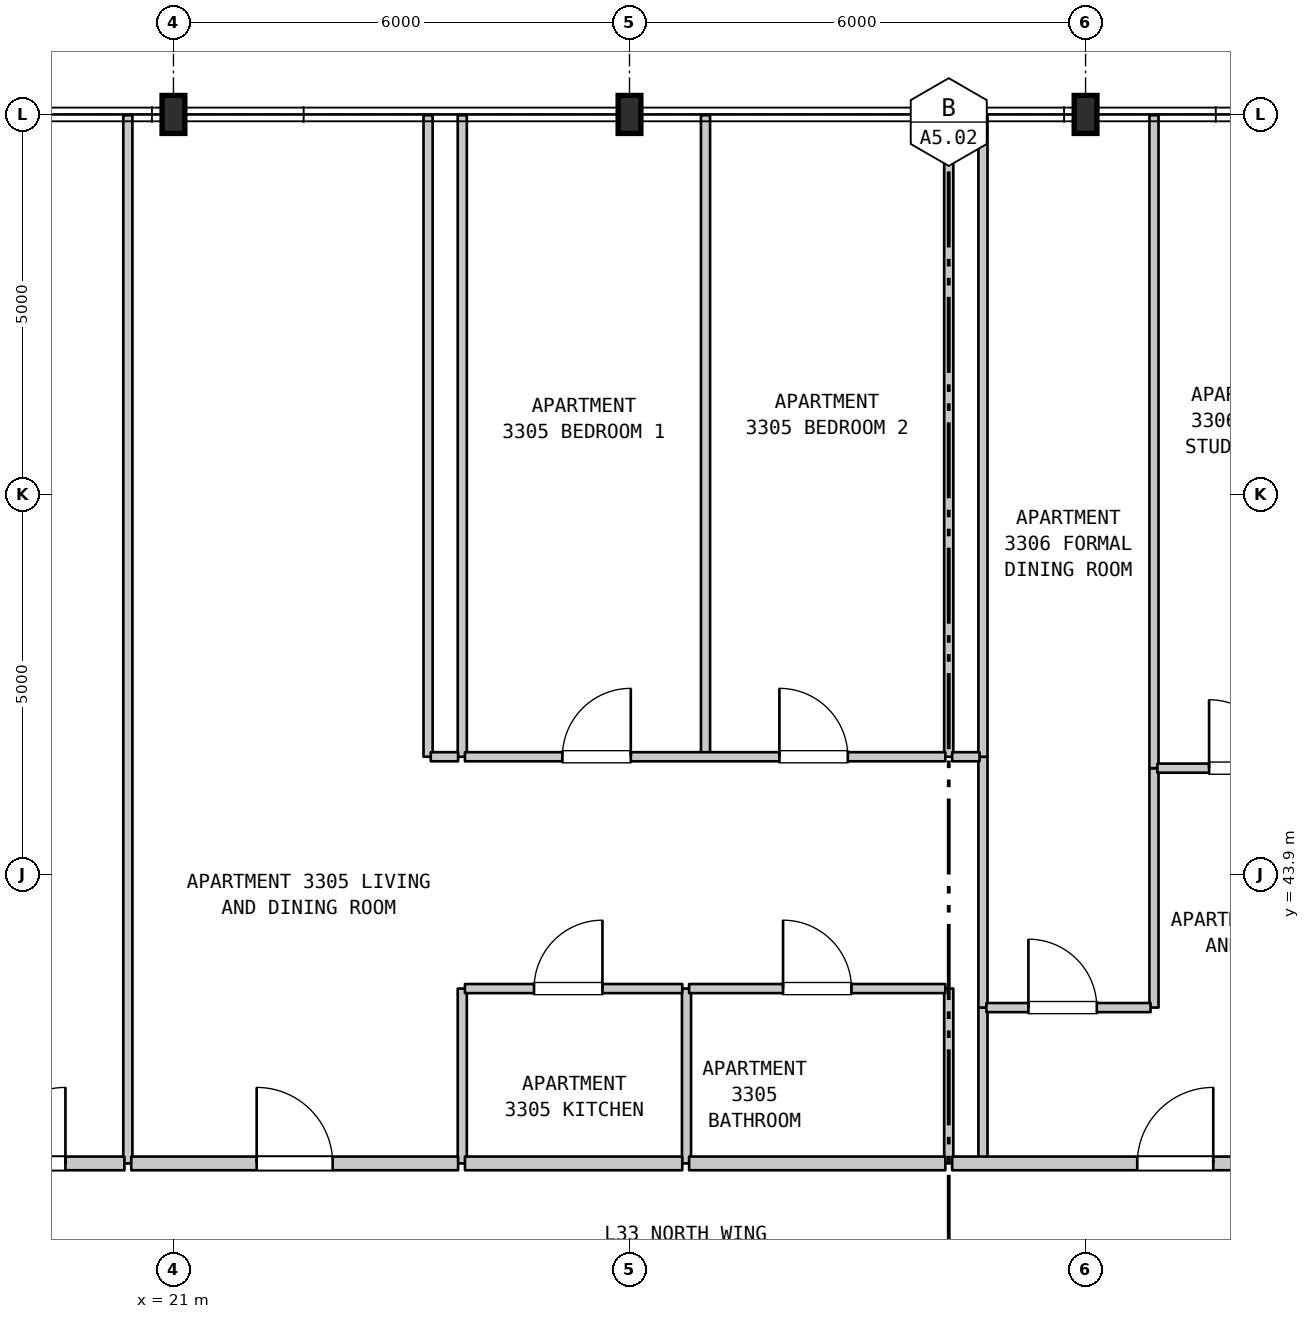
"""IFC4 building model, lengths in metres.
Left out: names, types, materials, properties, quantities, classifications, styles, units other than length and angle.
Written with IfcOpenShell. Run it as: python <this file> out.ifc"""

import sys

from ifc_helpers import new_model, si_unit, direction, frame, frame_2d, origin, origin_2d, place, context, subcontext, project, spatial, rectangle, i_section, extrude, element, fill, save


model = new_model("IFC4")
c1 = context("Model", 3, precision=1e-05, world=origin(), true_north=direction((0.0, 1.0)))
c2 = subcontext(c1, "Body", "Model", "MODEL_VIEW")
j1 = project(units=[si_unit("LENGTHUNIT", "METRE"), si_unit("PLANEANGLEUNIT", "RADIAN")], contexts=[c1])
p1 = place(None, origin())
s1 = spatial("IfcSite", under=j1, at=p1, CompositionType="ELEMENT")
p2 = place(p1, origin())
s2 = spatial("IfcBuilding", under=s1, at=p2, CompositionType="ELEMENT")
p3 = place(p2, frame((0.0, 0.0, 137.2)))
s3 = spatial("IfcBuildingStorey", under=s2, at=p3, CompositionType="ELEMENT", Elevation=137.2)
for number, where, z_axis, x_axis in (
    (1, (21.0, 53.9, 0.0), (0.0, 0.0, 1.0), (1.0, 0.0, 0.0)),
    (2, (27.0, 53.9, 0.0), (0.0, 0.0, 1.0), (1.0, 0.0, 0.0)),
    (3, (33.0, 53.9, 0.0), (0.0, 0.0, 1.0), (1.0, 0.0, 0.0)),
):
    element("IfcColumn", number, at=place(p3, frame(where, z_axis=z_axis, x_axis=x_axis)), inside=s3, PredefinedType="COLUMN", context=c2, shape_type="SweptSolid", body=[
        extrude(i_section(OverallWidth=0.3, OverallDepth=0.5, WebThickness=0.014, FlangeThickness=0.028, FilletRadius=0.027, at=origin_2d()), origin(), (0.0, 0.0, 1.0), 3.7),
    ])
p4 = place(p3, frame((20.4, 40.1, 0.0), z_axis=(0.0, 0.0, 1.0), x_axis=(0.0, 1.0, 0.0)))
e4 = element("IfcWall", 4, at=p4, inside=s3, PredefinedType="PARTITIONING", context=c2, shape_type="SweptSolid", body=[
    extrude(rectangle(XDim=13.79, YDim=0.12, at=frame_2d((6.895, 0.0))), origin(), (0.0, 0.0, 1.0), 3.385),
])
p5 = place(p3, frame((24.35, 45.45, 0.0), z_axis=(0.0, 0.0, 1.0), x_axis=(0.0, 1.0, 0.0)))
e5 = element("IfcWall", 5, at=p5, inside=s3, PredefinedType="PARTITIONING", context=c2, shape_type="SweptSolid", body=[
    extrude(rectangle(XDim=8.44, YDim=0.12, at=frame_2d((4.22, 0.0))), origin(), (0.0, 0.0, 1.0), 3.385),
])
p6 = place(p3, frame((24.8, 40.1, 0.0), z_axis=(0.0, 0.0, 1.0), x_axis=(0.0, 1.0, 0.0)))
e6 = element("IfcWall", 6, at=p6, inside=s3, PredefinedType="PARTITIONING", context=c2, shape_type="SweptSolid", body=[
    extrude(rectangle(XDim=2.3, YDim=0.12, at=frame_2d((1.15, 0.0))), origin(), (0.0, 0.0, 1.0), 3.385),
])
p7 = place(p3, frame((24.8, 45.45, 0.0), z_axis=(0.0, 0.0, 1.0), x_axis=(0.0, 1.0, 0.0)))
e7 = element("IfcWall", 7, at=p7, inside=s3, PredefinedType="PARTITIONING", context=c2, shape_type="SweptSolid", body=[
    extrude(rectangle(XDim=8.44, YDim=0.12, at=frame_2d((4.22, 0.0))), origin(), (0.0, 0.0, 1.0), 3.385),
])
p8 = place(p3, frame((27.75, 40.1, 0.0), z_axis=(0.0, 0.0, 1.0), x_axis=(0.0, 1.0, 0.0)))
e8 = element("IfcWall", 8, at=p8, inside=s3, PredefinedType="PARTITIONING", context=c2, shape_type="SweptSolid", body=[
    extrude(rectangle(XDim=2.3, YDim=0.12, at=frame_2d((1.15, 0.0))), origin(), (0.0, 0.0, 1.0), 3.385),
])
p9 = place(p3, frame((28.0, 45.45, 0.0), z_axis=(0.0, 0.0, 1.0), x_axis=(0.0, 1.0, 0.0)))
e9 = element("IfcWall", 9, at=p9, inside=s3, PredefinedType="PARTITIONING", context=c2, shape_type="SweptSolid", body=[
    extrude(rectangle(XDim=8.44, YDim=0.12, at=frame_2d((4.22, 0.0))), origin(), (0.0, 0.0, 1.0), 3.385),
])
p10 = place(p3, frame((31.2, 40.1, 0.0), z_axis=(0.0, 0.0, 1.0), x_axis=(0.0, 1.0, 0.0)))
e10 = element("IfcWall", 10, at=p10, inside=s3, PredefinedType="PARTITIONING", context=c2, shape_type="SweptSolid", body=[
    extrude(rectangle(XDim=2.3, YDim=0.12, at=frame_2d((1.15, 0.0))), origin(), (0.0, 0.0, 1.0), 3.385),
])
p11 = place(p3, frame((31.2, 45.45, 0.0), z_axis=(0.0, 0.0, 1.0), x_axis=(0.0, 1.0, 0.0)))
e11 = element("IfcWall", 11, at=p11, inside=s3, PredefinedType="PARTITIONING", context=c2, shape_type="SweptSolid", body=[
    extrude(rectangle(XDim=8.44, YDim=0.12, at=frame_2d((4.22, 0.0))), origin(), (0.0, 0.0, 1.0), 3.385),
])
p12 = place(p3, frame((31.65, 40.1, 0.0), z_axis=(0.0, 0.0, 1.0), x_axis=(0.0, 1.0, 0.0)))
e12 = element("IfcWall", 12, at=p12, inside=s3, PredefinedType="PARTITIONING", context=c2, shape_type="SweptSolid", body=[
    extrude(rectangle(XDim=2.05, YDim=0.12, at=frame_2d((1.025, 0.0))), origin(), (0.0, 0.0, 1.0), 3.385),
])
p13 = place(p3, frame((31.65, 42.15, 0.0), z_axis=(0.0, 0.0, 1.0), x_axis=(0.0, 1.0, 0.0)))
e13 = element("IfcWall", 13, at=p13, inside=s3, PredefinedType="PARTITIONING", context=c2, shape_type="SweptSolid", body=[
    extrude(rectangle(XDim=3.3, YDim=0.12, at=frame_2d((1.65, 0.0))), origin(), (0.0, 0.0, 1.0), 3.385),
])
p14 = place(p3, frame((31.65, 45.45, 0.0), z_axis=(0.0, 0.0, 1.0), x_axis=(0.0, 1.0, 0.0)))
e14 = element("IfcWall", 14, at=p14, inside=s3, PredefinedType="PARTITIONING", context=c2, shape_type="SweptSolid", body=[
    extrude(rectangle(XDim=8.44, YDim=0.12, at=frame_2d((4.22, 0.0))), origin(), (0.0, 0.0, 1.0), 3.385),
])
p15 = place(p3, frame((33.9, 42.15, 0.0), z_axis=(0.0, 0.0, 1.0), x_axis=(0.0, 1.0, 0.0)))
e15 = element("IfcWall", 15, at=p15, inside=s3, PredefinedType="PARTITIONING", context=c2, shape_type="SweptSolid", body=[
    extrude(rectangle(XDim=3.15, YDim=0.12, at=frame_2d((1.575, 0.0))), origin(), (0.0, 0.0, 1.0), 3.385),
])
p16 = place(p3, frame((33.9, 45.3, 0.0), z_axis=(0.0, 0.0, 1.0), x_axis=(0.0, 1.0, 0.0)))
e16 = element("IfcWall", 16, at=p16, inside=s3, PredefinedType="PARTITIONING", context=c2, shape_type="SweptSolid", body=[
    extrude(rectangle(XDim=8.59, YDim=0.12, at=frame_2d((4.295, 0.0))), origin(), (0.0, 0.0, 1.0), 3.385),
])
p17 = place(p3, frame((17.945, 40.1, 0.0), z_axis=(0.0, 0.0, 1.0), x_axis=(1.0, 0.0, 0.0)))
e17 = element("IfcWall", 17, at=p17, inside=s3, PredefinedType="STANDARD", context=c2, shape_type="SweptSolid", body=[
    extrude(rectangle(XDim=2.41, YDim=0.18, at=frame_2d((1.205, 0.0))), origin(), (0.0, 0.0, 1.0), 3.385),
])
p18 = place(p17, frame((0.634, 0.0, 0.0)))
e18 = element("IfcOpeningElement", 18, at=p18, cuts=e17, PredefinedType="OPENING", context=c2, shape_type="SweptSolid", body=[
    extrude(rectangle(XDim=1.0, YDim=2.15, at=frame_2d((0.5, 1.075))), frame((0.0, 0.1, 0.0), z_axis=(0.0, -1.0, 0.0), x_axis=(1.0, 0.0, 0.0)), (0.0, 0.0, 1.0), 0.2),
])
p19 = place(p3, frame((20.445, 40.1, 0.0), z_axis=(0.0, 0.0, 1.0), x_axis=(1.0, 0.0, 0.0)))
e19 = element("IfcWall", 19, at=p19, inside=s3, PredefinedType="STANDARD", context=c2, shape_type="SweptSolid", body=[
    extrude(rectangle(XDim=4.3, YDim=0.18, at=frame_2d((2.15, 0.0))), origin(), (0.0, 0.0, 1.0), 3.385),
])
p20 = place(p19, frame((1.65, 0.0, 0.0)))
e20 = element("IfcOpeningElement", 20, at=p20, cuts=e19, PredefinedType="OPENING", context=c2, shape_type="SweptSolid", body=[
    extrude(rectangle(XDim=1.0, YDim=2.15, at=frame_2d((0.5, 1.075))), frame((0.0, 0.1, 0.0), z_axis=(0.0, -1.0, 0.0), x_axis=(1.0, 0.0, 0.0)), (0.0, 0.0, 1.0), 0.2),
])
p21 = place(p3, frame((24.835, 40.1, 0.0), z_axis=(0.0, 0.0, 1.0), x_axis=(1.0, 0.0, 0.0)))
e21 = element("IfcWall", 21, at=p21, inside=s3, PredefinedType="STANDARD", context=c2, shape_type="SweptSolid", body=[
    extrude(rectangle(XDim=2.859, YDim=0.18, at=frame_2d((1.43, 0.0))), origin(), (0.0, 0.0, 1.0), 3.385),
])
p22 = place(p3, frame((27.784, 40.1, 0.0), z_axis=(0.0, 0.0, 1.0), x_axis=(1.0, 0.0, 0.0)))
e22 = element("IfcWall", 22, at=p22, inside=s3, PredefinedType="STANDARD", context=c2, shape_type="SweptSolid", body=[
    extrude(rectangle(XDim=3.371, YDim=0.18, at=frame_2d((1.686, 0.0))), origin(), (0.0, 0.0, 1.0), 3.385),
])
p23 = place(p3, frame((31.245, 40.1, 0.0), z_axis=(0.0, 0.0, 1.0), x_axis=(1.0, 0.0, 0.0)))
e23 = element("IfcWall", 23, at=p23, inside=s3, PredefinedType="STANDARD", context=c2, shape_type="SweptSolid", body=[
    extrude(rectangle(XDim=5.545, YDim=0.18, at=frame_2d((2.772, 0.0))), origin(), (0.0, 0.0, 1.0), 3.385),
])
p24 = place(p23, frame((2.435, 0.0, 0.0)))
e24 = element("IfcOpeningElement", 24, at=p24, cuts=e23, PredefinedType="OPENING", context=c2, shape_type="SweptSolid", body=[
    extrude(rectangle(XDim=1.0, YDim=2.15, at=frame_2d((0.5, 1.075))), frame((0.0, 0.1, 0.0), z_axis=(0.0, -1.0, 0.0), x_axis=(1.0, 0.0, 0.0)), (0.0, 0.0, 1.0), 0.2),
])
p25 = place(p3, frame((31.695, 42.15, 0.0), z_axis=(0.0, 0.0, 1.0), x_axis=(1.0, 0.0, 0.0)))
e25 = element("IfcWall", 25, at=p25, inside=s3, PredefinedType="PARTITIONING", context=c2, shape_type="SweptSolid", body=[
    extrude(rectangle(XDim=2.16, YDim=0.12, at=frame_2d((1.08, 0.0))), origin(), (0.0, 0.0, 1.0), 3.385),
])
p26 = place(p25, frame((0.553, 0.0, 0.0)))
e26 = element("IfcOpeningElement", 26, at=p26, cuts=e25, PredefinedType="OPENING", context=c2, shape_type="SweptSolid", body=[
    extrude(rectangle(XDim=0.9, YDim=2.15, at=frame_2d((0.45, 1.075))), frame((0.0, 0.07, 0.0), z_axis=(0.0, -1.0, 0.0), x_axis=(1.0, 0.0, 0.0)), (0.0, 0.0, 1.0), 0.14),
])
p27 = place(p3, frame((24.835, 42.4, 0.0), z_axis=(0.0, 0.0, 1.0), x_axis=(1.0, 0.0, 0.0)))
e27 = element("IfcWall", 27, at=p27, inside=s3, PredefinedType="PARTITIONING", context=c2, shape_type="SweptSolid", body=[
    extrude(rectangle(XDim=2.859, YDim=0.12, at=frame_2d((1.43, 0.0))), origin(), (0.0, 0.0, 1.0), 3.385),
])
p28 = place(p27, frame((0.909, 0.0, 0.0)))
e28 = element("IfcOpeningElement", 28, at=p28, cuts=e27, PredefinedType="OPENING", context=c2, shape_type="SweptSolid", body=[
    extrude(rectangle(XDim=0.9, YDim=2.15, at=frame_2d((0.45, 1.075))), frame((0.0, 0.07, 0.0), z_axis=(0.0, -1.0, 0.0), x_axis=(1.0, 0.0, 0.0)), (0.0, 0.0, 1.0), 0.14),
])
p29 = place(p3, frame((27.784, 42.4, 0.0), z_axis=(0.0, 0.0, 1.0), x_axis=(1.0, 0.0, 0.0)))
e29 = element("IfcWall", 29, at=p29, inside=s3, PredefinedType="PARTITIONING", context=c2, shape_type="SweptSolid", body=[
    extrude(rectangle(XDim=3.371, YDim=0.12, at=frame_2d((1.686, 0.0))), origin(), (0.0, 0.0, 1.0), 3.385),
])
p30 = place(p29, frame((1.236, 0.0, 0.0)))
e30 = element("IfcOpeningElement", 30, at=p30, cuts=e29, PredefinedType="OPENING", context=c2, shape_type="SweptSolid", body=[
    extrude(rectangle(XDim=0.9, YDim=2.1, at=frame_2d((0.45, 1.05))), frame((0.0, 0.07, 0.0), z_axis=(0.0, -1.0, 0.0), x_axis=(1.0, 0.0, 0.0)), (0.0, 0.0, 1.0), 0.14),
])
p31 = place(p3, frame((33.945, 45.3, 0.0), z_axis=(0.0, 0.0, 1.0), x_axis=(1.0, 0.0, 0.0)))
e31 = element("IfcWall", 31, at=p31, inside=s3, PredefinedType="PARTITIONING", context=c2, shape_type="SweptSolid", body=[
    extrude(rectangle(XDim=2.26, YDim=0.12, at=frame_2d((1.13, 0.0))), origin(), (0.0, 0.0, 1.0), 3.385),
])
p32 = place(p31, frame((0.68, 0.0, 0.0)))
e32 = element("IfcOpeningElement", 32, at=p32, cuts=e31, PredefinedType="OPENING", context=c2, shape_type="SweptSolid", body=[
    extrude(rectangle(XDim=0.9, YDim=2.15, at=frame_2d((0.45, 1.075))), frame((0.0, 0.07, 0.0), z_axis=(0.0, -1.0, 0.0), x_axis=(1.0, 0.0, 0.0)), (0.0, 0.0, 1.0), 0.14),
])
p33 = place(p3, frame((24.385, 45.45, 0.0), z_axis=(0.0, 0.0, 1.0), x_axis=(1.0, 0.0, 0.0)))
e33 = element("IfcWall", 33, at=p33, inside=s3, PredefinedType="PARTITIONING", context=c2, shape_type="SweptSolid", body=[
    extrude(rectangle(XDim=0.36, YDim=0.12, at=frame_2d((0.18, 0.0))), origin(), (0.0, 0.0, 1.0), 3.385),
])
p34 = place(p3, frame((24.835, 45.45, 0.0), z_axis=(0.0, 0.0, 1.0), x_axis=(1.0, 0.0, 0.0)))
e34 = element("IfcWall", 34, at=p34, inside=s3, PredefinedType="PARTITIONING", context=c2, shape_type="SweptSolid", body=[
    extrude(rectangle(XDim=6.32, YDim=0.12, at=frame_2d((3.16, 0.0))), origin(), (0.0, 0.0, 1.0), 3.385),
])
p35 = place(p34, frame((1.282, 0.0, 0.0)))
e35 = element("IfcOpeningElement", 35, at=p35, cuts=e34, PredefinedType="OPENING", context=c2, shape_type="SweptSolid", body=[
    extrude(rectangle(XDim=0.9, YDim=2.15, at=frame_2d((0.45, 1.075))), frame((0.0, 0.07, 0.0), z_axis=(0.0, -1.0, 0.0), x_axis=(1.0, 0.0, 0.0)), (0.0, 0.0, 1.0), 0.14),
])
p36 = place(p34, frame((4.137, 0.0, 0.0)))
e36 = element("IfcOpeningElement", 36, at=p36, cuts=e34, PredefinedType="OPENING", context=c2, shape_type="SweptSolid", body=[
    extrude(rectangle(XDim=0.9, YDim=2.15, at=frame_2d((0.45, 1.075))), frame((0.0, 0.07, 0.0), z_axis=(0.0, -1.0, 0.0), x_axis=(1.0, 0.0, 0.0)), (0.0, 0.0, 1.0), 0.14),
])
p37 = place(p3, frame((31.245, 45.45, 0.0), z_axis=(0.0, 0.0, 1.0), x_axis=(1.0, 0.0, 0.0)))
e37 = element("IfcWall", 37, at=p37, inside=s3, PredefinedType="PARTITIONING", context=c2, shape_type="SweptSolid", body=[
    extrude(rectangle(XDim=0.36, YDim=0.12, at=frame_2d((0.18, 0.0))), origin(), (0.0, 0.0, 1.0), 3.385),
])
p38 = place(p18, origin())
e38 = element("IfcDoor", 38, at=p38, inside=s3, OperationType="SINGLE_SWING_RIGHT", PredefinedType="DOOR", context=c2, shape_type="SweptSolid", body=[
    extrude(rectangle(XDim=1.0, YDim=2.15, at=frame_2d((0.5, 1.075))), frame((0.0, 0.025, 0.0), z_axis=(0.0, -1.0, 0.0), x_axis=(1.0, 0.0, 0.0)), (0.0, 0.0, 1.0), 0.05),
])
fill(e18, e38)
p39 = place(p20, origin())
e39 = element("IfcDoor", 39, at=p39, inside=s3, OperationType="SINGLE_SWING_LEFT", PredefinedType="DOOR", context=c2, shape_type="SweptSolid", body=[
    extrude(rectangle(XDim=1.0, YDim=2.15, at=frame_2d((0.5, 1.075))), frame((0.0, 0.025, 0.0), z_axis=(0.0, -1.0, 0.0), x_axis=(1.0, 0.0, 0.0)), (0.0, 0.0, 1.0), 0.05),
])
fill(e20, e39)
p40 = place(p24, origin())
e40 = element("IfcDoor", 40, at=p40, inside=s3, OperationType="SINGLE_SWING_RIGHT", PredefinedType="DOOR", context=c2, shape_type="SweptSolid", body=[
    extrude(rectangle(XDim=1.0, YDim=2.15, at=frame_2d((0.5, 1.075))), frame((0.0, 0.025, 0.0), z_axis=(0.0, -1.0, 0.0), x_axis=(1.0, 0.0, 0.0)), (0.0, 0.0, 1.0), 0.05),
])
fill(e24, e40)
p41 = place(p26, origin())
e41 = element("IfcDoor", 41, at=p41, inside=s3, OperationType="SINGLE_SWING_LEFT", PredefinedType="DOOR", context=c2, shape_type="SweptSolid", body=[
    extrude(rectangle(XDim=0.9, YDim=2.15, at=frame_2d((0.45, 1.075))), frame((0.0, 0.025, 0.0), z_axis=(0.0, -1.0, 0.0), x_axis=(1.0, 0.0, 0.0)), (0.0, 0.0, 1.0), 0.05),
])
fill(e26, e41)
p42 = place(p28, origin())
e42 = element("IfcDoor", 42, at=p42, inside=s3, OperationType="SINGLE_SWING_RIGHT", PredefinedType="DOOR", context=c2, shape_type="SweptSolid", body=[
    extrude(rectangle(XDim=0.9, YDim=2.15, at=frame_2d((0.45, 1.075))), frame((0.0, 0.025, 0.0), z_axis=(0.0, -1.0, 0.0), x_axis=(1.0, 0.0, 0.0)), (0.0, 0.0, 1.0), 0.05),
])
fill(e28, e42)
p43 = place(p30, origin())
e43 = element("IfcDoor", 43, at=p43, inside=s3, OperationType="SINGLE_SWING_LEFT", PredefinedType="DOOR", context=c2, shape_type="SweptSolid", body=[
    extrude(rectangle(XDim=0.9, YDim=2.1, at=frame_2d((0.45, 1.05))), frame((0.0, 0.025, 0.0), z_axis=(0.0, -1.0, 0.0), x_axis=(1.0, 0.0, 0.0)), (0.0, 0.0, 1.0), 0.05),
])
fill(e30, e43)
p44 = place(p32, origin())
e44 = element("IfcDoor", 44, at=p44, inside=s3, OperationType="SINGLE_SWING_LEFT", PredefinedType="DOOR", context=c2, shape_type="SweptSolid", body=[
    extrude(rectangle(XDim=0.9, YDim=2.15, at=frame_2d((0.45, 1.075))), frame((0.0, 0.025, 0.0), z_axis=(0.0, -1.0, 0.0), x_axis=(1.0, 0.0, 0.0)), (0.0, 0.0, 1.0), 0.05),
])
fill(e32, e44)
p45 = place(p35, origin())
e45 = element("IfcDoor", 45, at=p45, inside=s3, OperationType="SINGLE_SWING_RIGHT", PredefinedType="DOOR", context=c2, shape_type="SweptSolid", body=[
    extrude(rectangle(XDim=0.9, YDim=2.15, at=frame_2d((0.45, 1.075))), frame((0.0, 0.025, 0.0), z_axis=(0.0, -1.0, 0.0), x_axis=(1.0, 0.0, 0.0)), (0.0, 0.0, 1.0), 0.05),
])
fill(e35, e45)
p46 = place(p36, origin())
e46 = element("IfcDoor", 46, at=p46, inside=s3, OperationType="SINGLE_SWING_LEFT", PredefinedType="DOOR", context=c2, shape_type="SweptSolid", body=[
    extrude(rectangle(XDim=0.9, YDim=2.15, at=frame_2d((0.45, 1.075))), frame((0.0, 0.025, 0.0), z_axis=(0.0, -1.0, 0.0), x_axis=(1.0, 0.0, 0.0)), (0.0, 0.0, 1.0), 0.05),
])
fill(e36, e46)
save(model, sys.argv[1])
